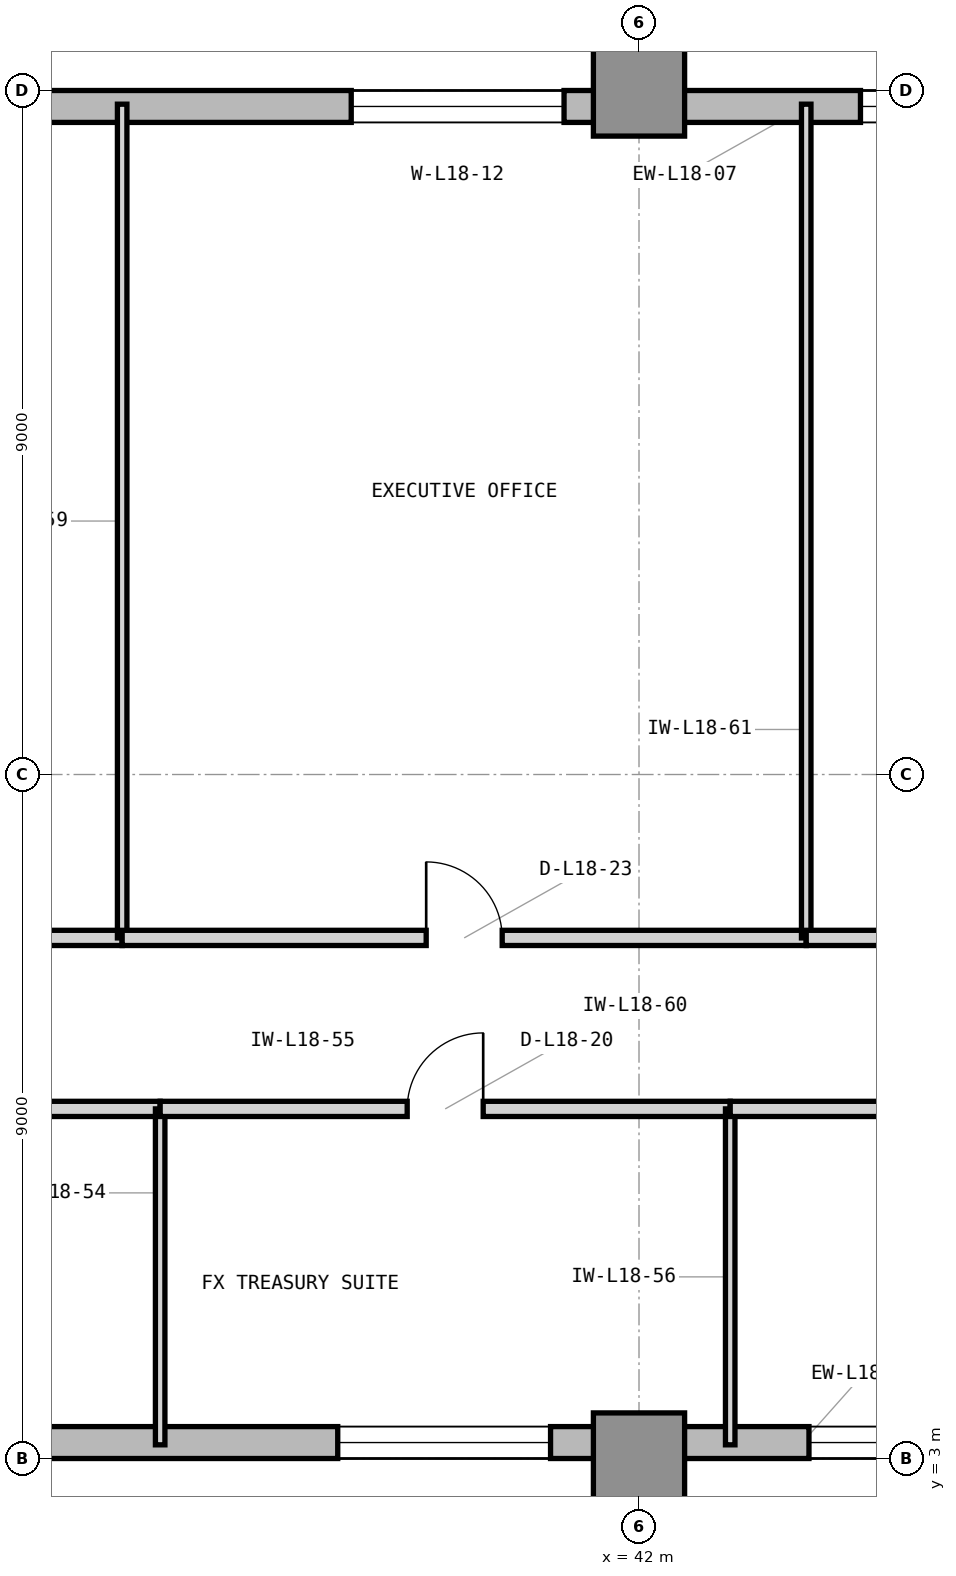
"""IFC4 building model, lengths in metres.
Left out: names, types, materials, properties, quantities, classifications, styles, units other than length and angle.
Written with IfcOpenShell. Run it as: python <this file> out.ifc"""

import sys

from ifc_helpers import new_model, si_unit, direction, frame, frame_2d, origin, origin_2d, place, context, subcontext, project, spatial, rectangle, extrude, element, fill, save


model = new_model("IFC4")
c1 = context("Model", 3, precision=1e-05, world=origin(), true_north=direction((0.0, 1.0)))
c2 = subcontext(c1, "Body", "Model", "MODEL_VIEW")
j1 = project(units=[si_unit("LENGTHUNIT", "METRE"), si_unit("PLANEANGLEUNIT", "RADIAN")], contexts=[c1])
p1 = place(None, origin())
s1 = spatial("IfcSite", under=j1, at=p1, CompositionType="ELEMENT")
p2 = place(p1, origin())
s2 = spatial("IfcBuilding", under=s1, at=p2, CompositionType="ELEMENT")
p3 = place(p2, frame((0.0, 0.0, 80.4)))
s3 = spatial("IfcBuildingStorey", under=s2, at=p3, CompositionType="ELEMENT", Elevation=80.4)
for number, where, z_axis, x_axis in (
    (1, (42.0, 3.0, 0.0), (0.0, 0.0, 1.0), (1.0, 0.0, 0.0)),
    (2, (42.0, 21.0, 0.0), (0.0, 0.0, 1.0), (1.0, 0.0, 0.0)),
):
    element("IfcColumn", number, at=place(p3, frame(where, z_axis=z_axis, x_axis=x_axis)), inside=s3, PredefinedType="COLUMN", context=c2, shape_type="SweptSolid", body=[
        extrude(rectangle(XDim=1.2, YDim=1.2, at=origin_2d()), origin(), (0.0, 0.0, 1.0), 4.2),
    ])
p4 = place(p3, frame((23.9, 3.21, 0.0), z_axis=(0.0, 0.0, 1.0), x_axis=(1.0, 0.0, 0.0)))
e3 = element("IfcWall", 3, at=p4, inside=s3, PredefinedType="STANDARD", context=c2, shape_type="SweptSolid", body=[
    extrude(rectangle(XDim=40.5, YDim=0.42, at=frame_2d((20.25, 0.0))), origin(), (0.0, 0.0, 1.0), 3.92),
])
p5 = place(p4, frame((1.1, 0.0, 0.85)))
e4 = element("IfcOpeningElement", 4, at=p5, cuts=e3, PredefinedType="OPENING", context=c2, shape_type="SweptSolid", body=[
    extrude(rectangle(XDim=1.2, YDim=2.45, at=frame_2d((0.6, 1.225))), frame((0.0, 0.22, 0.0), z_axis=(0.0, -1.0, 0.0), x_axis=(1.0, 0.0, 0.0)), (0.0, 0.0, 1.0), 0.44),
])
p6 = place(p4, frame((5.336, 0.0, 0.85)))
e5 = element("IfcOpeningElement", 5, at=p6, cuts=e3, PredefinedType="OPENING", context=c2, shape_type="SweptSolid", body=[
    extrude(rectangle(XDim=2.8, YDim=2.45, at=frame_2d((1.4, 1.225))), frame((0.0, 0.22, 0.0), z_axis=(0.0, -1.0, 0.0), x_axis=(1.0, 0.0, 0.0)), (0.0, 0.0, 1.0), 0.44),
])
p7 = place(p4, frame((14.136, 0.0, 0.85)))
e6 = element("IfcOpeningElement", 6, at=p7, cuts=e3, PredefinedType="OPENING", context=c2, shape_type="SweptSolid", body=[
    extrude(rectangle(XDim=2.8, YDim=2.45, at=frame_2d((1.4, 1.225))), frame((0.0, 0.22, 0.0), z_axis=(0.0, -1.0, 0.0), x_axis=(1.0, 0.0, 0.0)), (0.0, 0.0, 1.0), 0.44),
])
p8 = place(p4, frame((20.336, 0.0, 0.85)))
e7 = element("IfcOpeningElement", 7, at=p8, cuts=e3, PredefinedType="OPENING", context=c2, shape_type="SweptSolid", body=[
    extrude(rectangle(XDim=2.8, YDim=2.45, at=frame_2d((1.4, 1.225))), frame((0.0, 0.22, 0.0), z_axis=(0.0, -1.0, 0.0), x_axis=(1.0, 0.0, 0.0)), (0.0, 0.0, 1.0), 0.44),
])
p9 = place(p3, frame((64.4, 20.79, 0.0), z_axis=(0.0, 0.0, 1.0), x_axis=(-1.0, 0.0, 0.0)))
e8 = element("IfcWall", 8, at=p9, inside=s3, PredefinedType="STANDARD", context=c2, shape_type="SweptSolid", body=[
    extrude(rectangle(XDim=40.4, YDim=0.42, at=frame_2d((20.2, 0.0))), origin(), (0.0, 0.0, 1.0), 3.92),
])
p10 = place(p9, frame((38.222, 0.0, 0.85)))
e9 = element("IfcOpeningElement", 9, at=p10, cuts=e8, PredefinedType="OPENING", context=c2, shape_type="SweptSolid", body=[
    extrude(rectangle(XDim=1.2, YDim=2.45, at=frame_2d((0.6, 1.225))), frame((0.0, 0.22, 0.0), z_axis=(0.0, -1.0, 0.0), x_axis=(1.0, 0.0, 0.0)), (0.0, 0.0, 1.0), 0.44),
])
p11 = place(p9, frame((32.386, 0.0, 0.85)))
e10 = element("IfcOpeningElement", 10, at=p11, cuts=e8, PredefinedType="OPENING", context=c2, shape_type="SweptSolid", body=[
    extrude(rectangle(XDim=2.8, YDim=2.45, at=frame_2d((1.4, 1.225))), frame((0.0, 0.22, 0.0), z_axis=(0.0, -1.0, 0.0), x_axis=(1.0, 0.0, 0.0)), (0.0, 0.0, 1.0), 0.44),
])
p12 = place(p9, frame((23.386, 0.0, 0.85)))
e11 = element("IfcOpeningElement", 11, at=p12, cuts=e8, PredefinedType="OPENING", context=c2, shape_type="SweptSolid", body=[
    extrude(rectangle(XDim=2.8, YDim=2.45, at=frame_2d((1.4, 1.225))), frame((0.0, 0.22, 0.0), z_axis=(0.0, -1.0, 0.0), x_axis=(1.0, 0.0, 0.0)), (0.0, 0.0, 1.0), 0.44),
])
p13 = place(p9, frame((17.386, 0.0, 0.85)))
e12 = element("IfcOpeningElement", 12, at=p13, cuts=e8, PredefinedType="OPENING", context=c2, shape_type="SweptSolid", body=[
    extrude(rectangle(XDim=2.1, YDim=2.45, at=frame_2d((1.05, 1.225))), frame((0.0, 0.22, 0.0), z_axis=(0.0, -1.0, 0.0), x_axis=(1.0, 0.0, 0.0)), (0.0, 0.0, 1.0), 0.44),
])
p14 = place(p9, frame((8.436, 0.0, 0.85)))
e13 = element("IfcOpeningElement", 13, at=p14, cuts=e8, PredefinedType="OPENING", context=c2, shape_type="SweptSolid", body=[
    extrude(rectangle(XDim=1.2, YDim=2.45, at=frame_2d((0.6, 1.225))), frame((0.0, 0.22, 0.0), z_axis=(0.0, -1.0, 0.0), x_axis=(1.0, 0.0, 0.0)), (0.0, 0.0, 1.0), 0.44),
])
p15 = place(p3, frame((26.7, 7.6, 0.0), z_axis=(0.0, 0.0, 1.0), x_axis=(1.0, 0.0, 0.0)))
e14 = element("IfcWall", 14, at=p15, inside=s3, PredefinedType="PARTITIONING", context=c2, shape_type="SweptSolid", body=[
    extrude(rectangle(XDim=9.0, YDim=0.2, at=frame_2d((4.5, 0.0))), origin(), (0.0, 0.0, 1.0), 3.91),
])
p16 = place(p15, frame((3.5, 0.0, 0.0)))
e15 = element("IfcOpeningElement", 15, at=p16, cuts=e14, PredefinedType="OPENING", context=c2, shape_type="SweptSolid", body=[
    extrude(rectangle(XDim=2.0, YDim=2.5, at=frame_2d((1.0, 1.25))), frame((0.0, 0.11, 0.0), z_axis=(0.0, -1.0, 0.0), x_axis=(1.0, 0.0, 0.0)), (0.0, 0.0, 1.0), 0.22),
])
p17 = place(p3, frame((35.7, 3.18, 0.0), z_axis=(0.0, 0.0, 1.0), x_axis=(0.0, 1.0, 0.0)))
e16 = element("IfcWall", 16, at=p17, inside=s3, PredefinedType="PARTITIONING", context=c2, shape_type="SweptSolid", body=[
    extrude(rectangle(XDim=4.42, YDim=0.125, at=frame_2d((2.21, 0.0))), origin(), (0.0, 0.0, 1.0), 3.91),
])
p18 = place(p3, frame((35.7, 7.6, 0.0), z_axis=(0.0, 0.0, 1.0), x_axis=(1.0, 0.0, 0.0)))
e17 = element("IfcWall", 17, at=p18, inside=s3, PredefinedType="PARTITIONING", context=c2, shape_type="SweptSolid", body=[
    extrude(rectangle(XDim=7.5, YDim=0.2, at=frame_2d((3.75, 0.0))), origin(), (0.0, 0.0, 1.0), 3.91),
])
p19 = place(p18, frame((3.25, 0.0, 0.0)))
e18 = element("IfcOpeningElement", 18, at=p19, cuts=e17, PredefinedType="OPENING", context=c2, shape_type="SweptSolid", body=[
    extrude(rectangle(XDim=1.0, YDim=2.15, at=frame_2d((0.5, 1.075))), frame((0.0, 0.11, 0.0), z_axis=(0.0, -1.0, 0.0), x_axis=(1.0, 0.0, 0.0)), (0.0, 0.0, 1.0), 0.22),
])
p20 = place(p3, frame((43.2, 3.18, 0.0), z_axis=(0.0, 0.0, 1.0), x_axis=(0.0, 1.0, 0.0)))
e19 = element("IfcWall", 19, at=p20, inside=s3, PredefinedType="PARTITIONING", context=c2, shape_type="SweptSolid", body=[
    extrude(rectangle(XDim=4.42, YDim=0.125, at=frame_2d((2.21, 0.0))), origin(), (0.0, 0.0, 1.0), 3.91),
])
p21 = place(p3, frame((43.2, 7.6, 0.0), z_axis=(0.0, 0.0, 1.0), x_axis=(1.0, 0.0, 0.0)))
e20 = element("IfcWall", 20, at=p21, inside=s3, PredefinedType="PARTITIONING", context=c2, shape_type="SweptSolid", body=[
    extrude(rectangle(XDim=14.3, YDim=0.2, at=frame_2d((7.15, 0.0))), origin(), (0.0, 0.0, 1.0), 3.91),
])
p22 = place(p21, frame((6.4, 0.0, 0.0)))
e21 = element("IfcOpeningElement", 21, at=p22, cuts=e20, PredefinedType="OPENING", context=c2, shape_type="SweptSolid", body=[
    extrude(rectangle(XDim=1.5, YDim=2.3, at=frame_2d((0.75, 1.15))), frame((0.0, 0.11, 0.0), z_axis=(0.0, -1.0, 0.0), x_axis=(1.0, 0.0, 0.0)), (0.0, 0.0, 1.0), 0.22),
])
p23 = place(p3, frame((26.7, 9.85, 0.0), z_axis=(0.0, 0.0, 1.0), x_axis=(1.0, 0.0, 0.0)))
e22 = element("IfcWall", 22, at=p23, inside=s3, PredefinedType="PARTITIONING", context=c2, shape_type="SweptSolid", body=[
    extrude(rectangle(XDim=8.5, YDim=0.2, at=frame_2d((4.25, 0.0))), origin(), (0.0, 0.0, 1.0), 3.91),
])
p24 = place(p23, frame((3.5, 0.0, 0.0)))
e23 = element("IfcOpeningElement", 23, at=p24, cuts=e22, PredefinedType="OPENING", context=c2, shape_type="SweptSolid", body=[
    extrude(rectangle(XDim=1.5, YDim=2.3, at=frame_2d((0.75, 1.15))), frame((0.0, 0.11, 0.0), z_axis=(0.0, -1.0, 0.0), x_axis=(1.0, 0.0, 0.0)), (0.0, 0.0, 1.0), 0.22),
])
p25 = place(p3, frame((35.2, 9.85, 0.0), z_axis=(0.0, 0.0, 1.0), x_axis=(0.0, 1.0, 0.0)))
e24 = element("IfcWall", 24, at=p25, inside=s3, PredefinedType="PARTITIONING", context=c2, shape_type="SweptSolid", body=[
    extrude(rectangle(XDim=10.97, YDim=0.125, at=frame_2d((5.485, 0.0))), origin(), (0.0, 0.0, 1.0), 3.91),
])
p26 = place(p3, frame((35.2, 9.85, 0.0), z_axis=(0.0, 0.0, 1.0), x_axis=(1.0, 0.0, 0.0)))
e25 = element("IfcWall", 25, at=p26, inside=s3, PredefinedType="PARTITIONING", context=c2, shape_type="SweptSolid", body=[
    extrude(rectangle(XDim=9.0, YDim=0.2, at=frame_2d((4.5, 0.0))), origin(), (0.0, 0.0, 1.0), 3.91),
])
p27 = place(p26, frame((4.0, 0.0, 0.0)))
e26 = element("IfcOpeningElement", 26, at=p27, cuts=e25, PredefinedType="OPENING", context=c2, shape_type="SweptSolid", body=[
    extrude(rectangle(XDim=1.0, YDim=2.15, at=frame_2d((0.5, 1.075))), frame((0.0, 0.11, 0.0), z_axis=(0.0, -1.0, 0.0), x_axis=(1.0, 0.0, 0.0)), (0.0, 0.0, 1.0), 0.22),
])
p28 = place(p3, frame((44.2, 9.85, 0.0), z_axis=(0.0, 0.0, 1.0), x_axis=(0.0, 1.0, 0.0)))
e27 = element("IfcWall", 27, at=p28, inside=s3, PredefinedType="PARTITIONING", context=c2, shape_type="SweptSolid", body=[
    extrude(rectangle(XDim=10.97, YDim=0.125, at=frame_2d((5.485, 0.0))), origin(), (0.0, 0.0, 1.0), 3.91),
])
p29 = place(p3, frame((44.2, 9.85, 0.0), z_axis=(0.0, 0.0, 1.0), x_axis=(1.0, 0.0, 0.0)))
e28 = element("IfcWall", 28, at=p29, inside=s3, PredefinedType="PARTITIONING", context=c2, shape_type="SweptSolid", body=[
    extrude(rectangle(XDim=9.0, YDim=0.2, at=frame_2d((4.5, 0.0))), origin(), (0.0, 0.0, 1.0), 3.91),
])
p30 = place(p29, frame((4.0, 0.0, 0.0)))
e29 = element("IfcOpeningElement", 29, at=p30, cuts=e28, PredefinedType="OPENING", context=c2, shape_type="SweptSolid", body=[
    extrude(rectangle(XDim=1.0, YDim=2.15, at=frame_2d((0.5, 1.075))), frame((0.0, 0.11, 0.0), z_axis=(0.0, -1.0, 0.0), x_axis=(1.0, 0.0, 0.0)), (0.0, 0.0, 1.0), 0.22),
])
p31 = place(p19, origin())
e30 = element("IfcDoor", 30, at=p31, inside=s3, OperationType="SINGLE_SWING_RIGHT", PredefinedType="DOOR", context=c2, shape_type="SweptSolid", body=[
    extrude(rectangle(XDim=1.0, YDim=2.15, at=frame_2d((0.5, 1.075))), frame((0.0, 0.025, 0.0), z_axis=(0.0, -1.0, 0.0), x_axis=(1.0, 0.0, 0.0)), (0.0, 0.0, 1.0), 0.05),
])
fill(e18, e30)
p32 = place(p27, origin())
e31 = element("IfcDoor", 31, at=p32, inside=s3, OperationType="SINGLE_SWING_LEFT", PredefinedType="DOOR", context=c2, shape_type="SweptSolid", body=[
    extrude(rectangle(XDim=1.0, YDim=2.15, at=frame_2d((0.5, 1.075))), frame((0.0, 0.025, 0.0), z_axis=(0.0, -1.0, 0.0), x_axis=(1.0, 0.0, 0.0)), (0.0, 0.0, 1.0), 0.05),
])
fill(e26, e31)
p33 = place(p7, origin())
e32 = element("IfcWindow", 32, at=p33, inside=s3, PartitioningType="SINGLE_PANEL", PredefinedType="WINDOW", context=c2, shape_type="SweptSolid", body=[
    extrude(rectangle(XDim=2.8, YDim=2.45, at=frame_2d((1.4, 1.225))), frame((0.0, 0.11, 0.0), z_axis=(0.0, -1.0, 0.0), x_axis=(1.0, 0.0, 0.0)), (0.0, 0.0, 1.0), 0.06),
])
fill(e6, e32)
p34 = place(p8, origin())
e33 = element("IfcWindow", 33, at=p34, inside=s3, PartitioningType="SINGLE_PANEL", PredefinedType="WINDOW", context=c2, shape_type="SweptSolid", body=[
    extrude(rectangle(XDim=2.8, YDim=2.45, at=frame_2d((1.4, 1.225))), frame((0.0, 0.11, 0.0), z_axis=(0.0, -1.0, 0.0), x_axis=(1.0, 0.0, 0.0)), (0.0, 0.0, 1.0), 0.06),
])
fill(e7, e33)
p35 = place(p12, origin())
e34 = element("IfcWindow", 34, at=p35, inside=s3, PartitioningType="SINGLE_PANEL", PredefinedType="WINDOW", context=c2, shape_type="SweptSolid", body=[
    extrude(rectangle(XDim=2.8, YDim=2.45, at=frame_2d((1.4, 1.225))), frame((0.0, 0.11, 0.0), z_axis=(0.0, -1.0, 0.0), x_axis=(1.0, 0.0, 0.0)), (0.0, 0.0, 1.0), 0.06),
])
fill(e11, e34)
p36 = place(p13, origin())
e35 = element("IfcWindow", 35, at=p36, inside=s3, PartitioningType="SINGLE_PANEL", PredefinedType="WINDOW", context=c2, shape_type="SweptSolid", body=[
    extrude(rectangle(XDim=2.1, YDim=2.45, at=frame_2d((1.05, 1.225))), frame((0.0, 0.11, 0.0), z_axis=(0.0, -1.0, 0.0), x_axis=(1.0, 0.0, 0.0)), (0.0, 0.0, 1.0), 0.06),
])
fill(e12, e35)
save(model, sys.argv[1])
